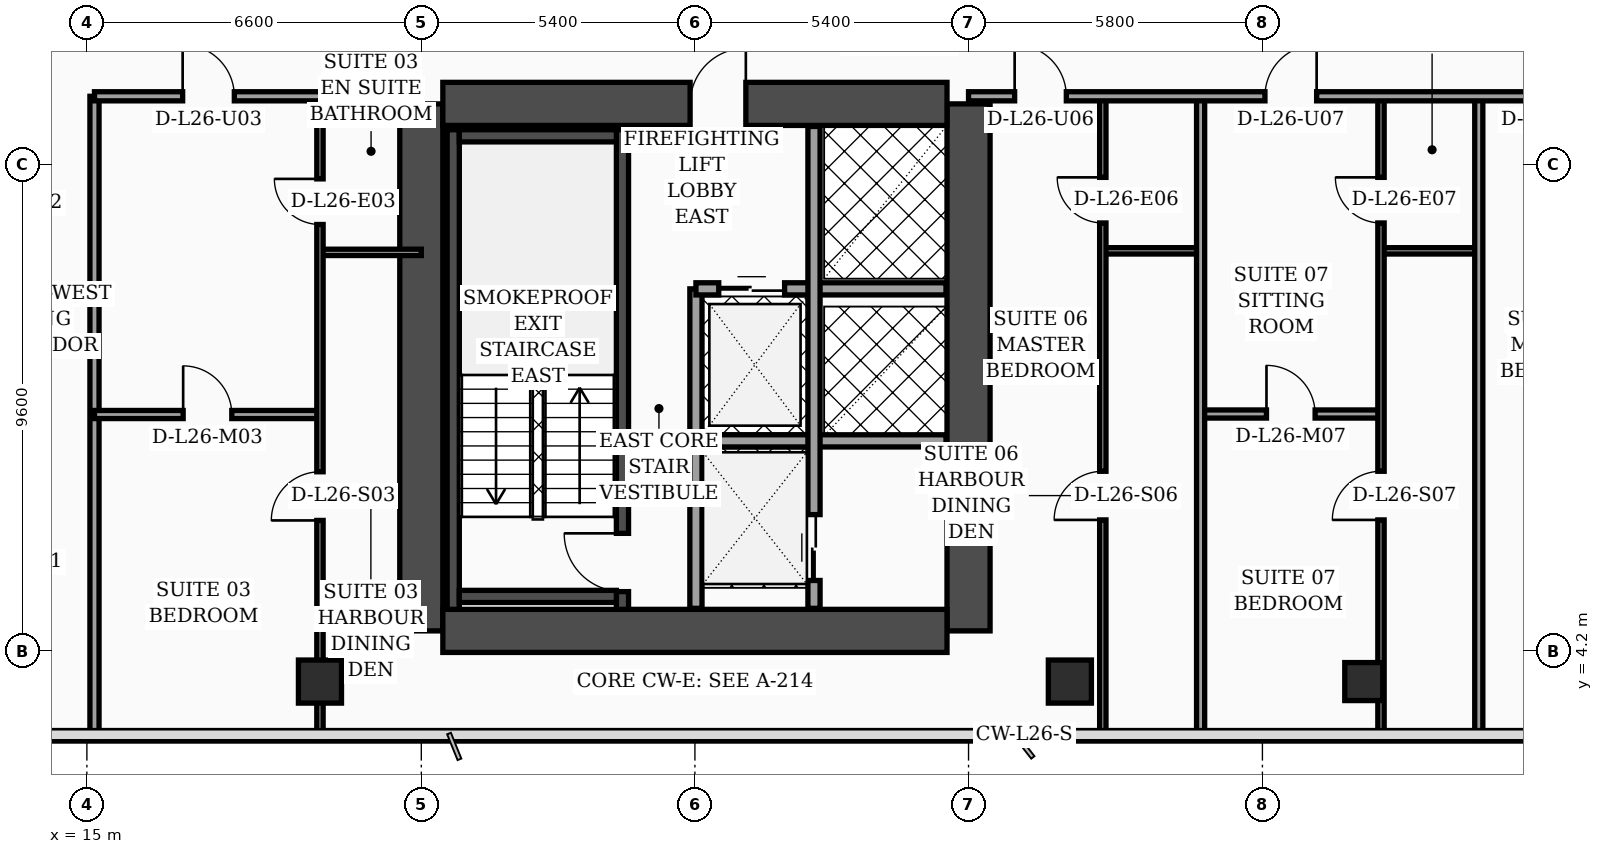
"""IFC4 building model, lengths in metres.
Left out: names, types, materials, properties, quantities, classifications, styles, units other than length and angle.
Written with IfcOpenShell. Run it as: python <this file> out.ifc"""

import sys

from ifc_helpers import new_model, si_unit, direction, frame, frame_2d, origin, origin_2d, place, context, subcontext, project, spatial, rectangle, hollow_rectangle, extrude, element, fill, save


model = new_model("IFC4")
c1 = context("Model", 3, precision=1e-05, world=origin(), true_north=direction((0.0, 1.0)))
c2 = subcontext(c1, "Body", "Model", "MODEL_VIEW")
j1 = project(units=[si_unit("LENGTHUNIT", "METRE"), si_unit("PLANEANGLEUNIT", "RADIAN")], contexts=[c1])
p1 = place(None, origin())
s1 = spatial("IfcSite", under=j1, at=p1, CompositionType="ELEMENT")
p2 = place(p1, origin())
s2 = spatial("IfcBuilding", under=s1, at=p2, CompositionType="ELEMENT")
p3 = place(p2, frame((0.0, 0.0, 108.8)))
s3 = spatial("IfcBuildingStorey", under=s2, at=p3, CompositionType="ELEMENT", Elevation=108.8)
for number, where, z_axis, x_axis in (
    (1, (21.6, 4.6, 0.0), (0.0, 0.0, 1.0), (0.0, 1.0, 0.0)),
    (2, (32.4, 4.6, 0.0), (0.0, 0.0, 1.0), (0.0, 1.0, 0.0)),
):
    element("IfcWall", number, at=place(p3, frame(where, z_axis=z_axis, x_axis=x_axis)), inside=s3, PredefinedType="SHEAR", context=c2, shape_type="SweptSolid", body=[
        extrude(rectangle(XDim=10.4, YDim=0.85, at=frame_2d((5.2, 0.0))), origin(), (0.0, 0.0, 1.0), 3.56),
    ])
p4 = place(p3, frame((22.025, 15.0, 0.0), z_axis=(0.0, 0.0, 1.0), x_axis=(1.0, 0.0, 0.0)))
e3 = element("IfcWall", 3, at=p4, inside=s3, PredefinedType="SHEAR", context=c2, shape_type="SweptSolid", body=[
    extrude(rectangle(XDim=9.95, YDim=0.85, at=frame_2d((4.975, 0.0))), origin(), (0.0, 0.0, 1.0), 3.56),
])
p5 = place(p4, frame((4.88, 0.0, 0.0)))
e4 = element("IfcOpeningElement", 4, at=p5, cuts=e3, PredefinedType="OPENING", context=c2, shape_type="SweptSolid", body=[
    extrude(rectangle(XDim=1.1, YDim=2.2, at=frame_2d((0.55, 1.1))), frame((0.0, 0.435, 0.0), z_axis=(0.0, -1.0, 0.0), x_axis=(1.0, 0.0, 0.0)), (0.0, 0.0, 1.0), 0.87),
])
p6 = place(p3, frame((22.025, 4.6, 0.0), z_axis=(0.0, 0.0, 1.0), x_axis=(1.0, 0.0, 0.0)))
e5 = element("IfcWall", 5, at=p6, inside=s3, PredefinedType="SHEAR", context=c2, shape_type="SweptSolid", body=[
    extrude(rectangle(XDim=9.95, YDim=0.85, at=frame_2d((4.975, 0.0))), origin(), (0.0, 0.0, 1.0), 3.56),
])
p7 = place(p3, frame((22.23, 5.025, 0.0), z_axis=(0.0, 0.0, 1.0), x_axis=(0.0, 1.0, 0.0)))
e6 = element("IfcWall", 6, at=p7, inside=s3, PredefinedType="SOLIDWALL", context=c2, shape_type="SweptSolid", body=[
    extrude(rectangle(XDim=9.465, YDim=0.24, at=frame_2d((4.732, 0.0))), origin(), (0.0, 0.0, 1.0), 3.56),
])
p8 = place(p3, frame((25.57, 5.025, 0.0), z_axis=(0.0, 0.0, 1.0), x_axis=(0.0, 1.0, 0.0)))
e7 = element("IfcWall", 7, at=p8, inside=s3, PredefinedType="SOLIDWALL", context=c2, shape_type="SweptSolid", body=[
    extrude(rectangle(XDim=9.465, YDim=0.24, at=frame_2d((4.732, 0.0))), origin(), (0.0, 0.0, 1.0), 3.56),
])
p9 = place(p8, frame((0.35, 0.0, 0.0)))
e8 = element("IfcOpeningElement", 8, at=p9, cuts=e7, PredefinedType="OPENING", context=c2, shape_type="SweptSolid", body=[
    extrude(rectangle(XDim=1.15, YDim=2.2, at=frame_2d((0.575, 1.1))), frame((0.0, 0.13, 0.0), z_axis=(0.0, -1.0, 0.0), x_axis=(1.0, 0.0, 0.0)), (0.0, 0.0, 1.0), 0.26),
])
for number, where, z_axis, x_axis in (
    (9, (22.35, 5.28, 0.0), (0.0, 0.0, 1.0), (1.0, 0.0, 0.0)),
    (10, (22.35, 14.37, 0.0), (0.0, 0.0, 1.0), (1.0, 0.0, 0.0)),
):
    element("IfcWall", number, at=place(p3, frame(where, z_axis=z_axis, x_axis=x_axis)), inside=s3, PredefinedType="SOLIDWALL", context=c2, shape_type="SweptSolid", body=[
        extrude(rectangle(XDim=3.1, YDim=0.24, at=frame_2d((1.55, 0.0))), origin(), (0.0, 0.0, 1.0), 3.56),
    ])
for number, where, z_axis, x_axis in (
    (11, (19.6, 3.6, 0.0), (0.0, 0.0, 1.0), (1.0, 0.0, 0.0)),
    (12, (34.4, 3.6, 0.0), (0.0, 0.0, 1.0), (1.0, 0.0, 0.0)),
):
    element("IfcColumn", number, at=place(p3, frame(where, z_axis=z_axis, x_axis=x_axis)), inside=s3, PredefinedType="COLUMN", context=c2, shape_type="SweptSolid", body=[
        extrude(hollow_rectangle(XDim=0.85, YDim=0.85, WallThickness=0.036, at=origin_2d()), origin(), (0.0, 0.0, 1.0), 3.56),
    ])
p10 = place(p3, frame((40.2, 3.6, 0.0), z_axis=(0.0, 0.0, 1.0), x_axis=(1.0, 0.0, 0.0)))
e13 = element("IfcColumn", 13, at=p10, inside=s3, PredefinedType="COLUMN", context=c2, shape_type="SweptSolid", body=[
    extrude(hollow_rectangle(XDim=0.75, YDim=0.75, WallThickness=0.032, at=origin_2d()), origin(), (0.0, 0.0, 1.0), 3.56),
])
p11 = place(p3, frame((27.02, 5.045, 0.0), z_axis=(0.0, 0.0, 1.0), x_axis=(0.0, 1.0, 0.0)))
e14 = element("IfcWall", 14, at=p11, inside=s3, PredefinedType="SOLIDWALL", context=c2, shape_type="SweptSolid", body=[
    extrude(rectangle(XDim=6.305, YDim=0.24, at=frame_2d((3.153, 0.0))), origin(), (0.0, 0.0, 1.0), 3.56),
])
p12 = place(p3, frame((27.02, 11.35, 0.0), z_axis=(0.0, 0.0, 1.0), x_axis=(1.0, 0.0, 0.0)))
e15 = element("IfcWall", 15, at=p12, inside=s3, PredefinedType="SOLIDWALL", context=c2, shape_type="SweptSolid", body=[
    extrude(rectangle(XDim=4.935, YDim=0.24, at=frame_2d((2.468, 0.0))), origin(), (0.0, 0.0, 1.0), 3.56),
])
p13 = place(p12, frame((0.45, 0.0, 0.0)))
e16 = element("IfcOpeningElement", 16, at=p13, cuts=e15, PredefinedType="OPENING", context=c2, shape_type="SweptSolid", body=[
    extrude(rectangle(XDim=1.3, YDim=2.35, at=frame_2d((0.65, 1.175))), frame((0.0, 0.13, 0.0), z_axis=(0.0, -1.0, 0.0), x_axis=(1.0, 0.0, 0.0)), (0.0, 0.0, 1.0), 0.26),
])
p14 = place(p3, frame((27.02, 8.35, 0.0), z_axis=(0.0, 0.0, 1.0), x_axis=(1.0, 0.0, 0.0)))
e17 = element("IfcWall", 17, at=p14, inside=s3, PredefinedType="SOLIDWALL", context=c2, shape_type="SweptSolid", body=[
    extrude(rectangle(XDim=4.935, YDim=0.24, at=frame_2d((2.468, 0.0))), origin(), (0.0, 0.0, 1.0), 3.56),
])
p15 = place(p3, frame((29.35, 5.045, 0.0), z_axis=(0.0, 0.0, 1.0), x_axis=(0.0, 1.0, 0.0)))
e18 = element("IfcWall", 18, at=p15, inside=s3, PredefinedType="SOLIDWALL", context=c2, shape_type="SweptSolid", body=[
    extrude(rectangle(XDim=9.51, YDim=0.24, at=frame_2d((4.755, 0.0))), origin(), (0.0, 0.0, 1.0), 3.56),
])
p16 = place(p15, frame((0.55, 0.0, 0.0)))
e19 = element("IfcOpeningElement", 19, at=p16, cuts=e18, PredefinedType="OPENING", context=c2, shape_type="SweptSolid", body=[
    extrude(rectangle(XDim=1.3, YDim=2.35, at=frame_2d((0.65, 1.175))), frame((0.0, 0.13, 0.0), z_axis=(0.0, -1.0, 0.0), x_axis=(1.0, 0.0, 0.0)), (0.0, 0.0, 1.0), 0.26),
])
p17 = place(p3, frame((15.15, 2.44, 0.0), z_axis=(0.0, 0.0, 1.0), x_axis=(0.0, 1.0, 0.0)))
e20 = element("IfcWall", 20, at=p17, inside=s3, PredefinedType="PARTITIONING", context=c2, shape_type="SweptSolid", body=[
    extrude(rectangle(XDim=12.71, YDim=0.18, at=frame_2d((6.355, 0.0))), origin(), (0.0, 0.0, 1.0), 3.04),
])
p18 = place(p3, frame((19.6, 12.07, 0.0), z_axis=(0.0, 0.0, 1.0), x_axis=(1.0, 0.0, 0.0)))
e21 = element("IfcWall", 21, at=p18, inside=s3, PredefinedType="PARTITIONING", context=c2, shape_type="SweptSolid", body=[
    extrude(rectangle(XDim=2.0, YDim=0.125, at=frame_2d((1.0, 0.0))), origin(), (0.0, 0.0, 1.0), 3.56),
])
p19 = place(p3, frame((15.15, 8.87, 0.0), z_axis=(0.0, 0.0, 1.0), x_axis=(1.0, 0.0, 0.0)))
e22 = element("IfcWall", 22, at=p19, inside=s3, PredefinedType="PARTITIONING", context=c2, shape_type="SweptSolid", body=[
    extrude(rectangle(XDim=4.45, YDim=0.16, at=frame_2d((2.225, 0.0))), origin(), (0.0, 0.0, 1.0), 3.56),
])
p20 = place(p19, frame((1.75, 0.0, 0.0)))
e23 = element("IfcOpeningElement", 23, at=p20, cuts=e22, PredefinedType="OPENING", context=c2, shape_type="SweptSolid", body=[
    extrude(rectangle(XDim=0.96, YDim=2.2, at=frame_2d((0.48, 1.1))), frame((0.0, 0.09, 0.0), z_axis=(0.0, -1.0, 0.0), x_axis=(1.0, 0.0, 0.0)), (0.0, 0.0, 1.0), 0.18),
])
p21 = place(p3, frame((19.6, 2.44, 0.0), z_axis=(0.0, 0.0, 1.0), x_axis=(0.0, 1.0, 0.0)))
e24 = element("IfcWall", 24, at=p21, inside=s3, PredefinedType="PARTITIONING", context=c2, shape_type="SweptSolid", body=[
    extrude(rectangle(XDim=12.71, YDim=0.125, at=frame_2d((6.355, 0.0))), origin(), (0.0, 0.0, 1.0), 2.49),
])
p22 = place(p21, frame((4.34, 0.0, 0.0)))
e25 = element("IfcOpeningElement", 25, at=p22, cuts=e24, PredefinedType="OPENING", context=c2, shape_type="SweptSolid", body=[
    extrude(rectangle(XDim=0.96, YDim=2.2, at=frame_2d((0.48, 1.1))), frame((0.0, 0.073, 0.0), z_axis=(0.0, -1.0, 0.0), x_axis=(1.0, 0.0, 0.0)), (0.0, 0.0, 1.0), 0.145),
])
p23 = place(p21, frame((10.18, 0.0, 0.0)))
e26 = element("IfcOpeningElement", 26, at=p23, cuts=e24, PredefinedType="OPENING", context=c2, shape_type="SweptSolid", body=[
    extrude(rectangle(XDim=0.9, YDim=2.15, at=frame_2d((0.45, 1.075))), frame((0.0, 0.073, 0.0), z_axis=(0.0, -1.0, 0.0), x_axis=(1.0, 0.0, 0.0)), (0.0, 0.0, 1.0), 0.145),
])
p24 = place(p3, frame((15.15, 15.15, 0.0), z_axis=(0.0, 0.0, 1.0), x_axis=(1.0, 0.0, 0.0)))
e27 = element("IfcWall", 27, at=p24, inside=s3, PredefinedType="PARTITIONING", context=c2, shape_type="SweptSolid", body=[
    extrude(rectangle(XDim=6.45, YDim=0.18, at=frame_2d((3.225, 0.0))), origin(), (0.0, 0.0, 1.0), 2.49),
])
p25 = place(p24, frame((1.74, 0.0, 0.0)))
e28 = element("IfcOpeningElement", 28, at=p25, cuts=e27, PredefinedType="OPENING", context=c2, shape_type="SweptSolid", body=[
    extrude(rectangle(XDim=1.02, YDim=2.2, at=frame_2d((0.51, 1.1))), frame((0.0, 0.1, 0.0), z_axis=(0.0, -1.0, 0.0), x_axis=(1.0, 0.0, 0.0)), (0.0, 0.0, 1.0), 0.2),
])
p26 = place(p3, frame((35.05, 12.1, 0.0), z_axis=(0.0, 0.0, 1.0), x_axis=(1.0, 0.0, 0.0)))
e29 = element("IfcWall", 29, at=p26, inside=s3, PredefinedType="PARTITIONING", context=c2, shape_type="SweptSolid", body=[
    extrude(rectangle(XDim=1.93, YDim=0.125, at=frame_2d((0.965, 0.0))), origin(), (0.0, 0.0, 1.0), 2.84),
])
p27 = place(p3, frame((35.05, 2.44, 0.0), z_axis=(0.0, 0.0, 1.0), x_axis=(0.0, 1.0, 0.0)))
e30 = element("IfcWall", 30, at=p27, inside=s3, PredefinedType="PARTITIONING", context=c2, shape_type="SweptSolid", body=[
    extrude(rectangle(XDim=12.71, YDim=0.125, at=frame_2d((6.355, 0.0))), origin(), (0.0, 0.0, 1.0), 2.84),
])
p28 = place(p27, frame((4.35, 0.0, 0.0)))
e31 = element("IfcOpeningElement", 31, at=p28, cuts=e30, PredefinedType="OPENING", context=c2, shape_type="SweptSolid", body=[
    extrude(rectangle(XDim=0.96, YDim=2.2, at=frame_2d((0.48, 1.1))), frame((0.0, 0.073, 0.0), z_axis=(0.0, -1.0, 0.0), x_axis=(1.0, 0.0, 0.0)), (0.0, 0.0, 1.0), 0.145),
])
p29 = place(p27, frame((10.21, 0.0, 0.0)))
e32 = element("IfcOpeningElement", 32, at=p29, cuts=e30, PredefinedType="OPENING", context=c2, shape_type="SweptSolid", body=[
    extrude(rectangle(XDim=0.9, YDim=2.15, at=frame_2d((0.45, 1.075))), frame((0.0, 0.073, 0.0), z_axis=(0.0, -1.0, 0.0), x_axis=(1.0, 0.0, 0.0)), (0.0, 0.0, 1.0), 0.145),
])
p30 = place(p3, frame((40.54, 12.1, 0.0), z_axis=(0.0, 0.0, 1.0), x_axis=(1.0, 0.0, 0.0)))
e33 = element("IfcWall", 33, at=p30, inside=s3, PredefinedType="PARTITIONING", context=c2, shape_type="SweptSolid", body=[
    extrude(rectangle(XDim=1.93, YDim=0.125, at=frame_2d((0.965, 0.0))), origin(), (0.0, 0.0, 1.0), 3.56),
])
p31 = place(p3, frame((36.98, 8.88, 0.0), z_axis=(0.0, 0.0, 1.0), x_axis=(1.0, 0.0, 0.0)))
e34 = element("IfcWall", 34, at=p31, inside=s3, PredefinedType="PARTITIONING", context=c2, shape_type="SweptSolid", body=[
    extrude(rectangle(XDim=3.56, YDim=0.16, at=frame_2d((1.78, 0.0))), origin(), (0.0, 0.0, 1.0), 2.84),
])
p32 = place(p31, frame((1.3, 0.0, 0.0)))
e35 = element("IfcOpeningElement", 35, at=p32, cuts=e34, PredefinedType="OPENING", context=c2, shape_type="SweptSolid", body=[
    extrude(rectangle(XDim=0.96, YDim=2.2, at=frame_2d((0.48, 1.1))), frame((0.0, 0.09, 0.0), z_axis=(0.0, -1.0, 0.0), x_axis=(1.0, 0.0, 0.0)), (0.0, 0.0, 1.0), 0.18),
])
p33 = place(p3, frame((40.54, 2.44, 0.0), z_axis=(0.0, 0.0, 1.0), x_axis=(0.0, 1.0, 0.0)))
e36 = element("IfcWall", 36, at=p33, inside=s3, PredefinedType="PARTITIONING", context=c2, shape_type="SweptSolid", body=[
    extrude(rectangle(XDim=12.71, YDim=0.125, at=frame_2d((6.355, 0.0))), origin(), (0.0, 0.0, 1.0), 2.84),
])
p34 = place(p33, frame((4.35, 0.0, 0.0)))
e37 = element("IfcOpeningElement", 37, at=p34, cuts=e36, PredefinedType="OPENING", context=c2, shape_type="SweptSolid", body=[
    extrude(rectangle(XDim=0.96, YDim=2.2, at=frame_2d((0.48, 1.1))), frame((0.0, 0.073, 0.0), z_axis=(0.0, -1.0, 0.0), x_axis=(1.0, 0.0, 0.0)), (0.0, 0.0, 1.0), 0.145),
])
p35 = place(p33, frame((10.21, 0.0, 0.0)))
e38 = element("IfcOpeningElement", 38, at=p35, cuts=e36, PredefinedType="OPENING", context=c2, shape_type="SweptSolid", body=[
    extrude(rectangle(XDim=0.9, YDim=2.15, at=frame_2d((0.45, 1.075))), frame((0.0, 0.073, 0.0), z_axis=(0.0, -1.0, 0.0), x_axis=(1.0, 0.0, 0.0)), (0.0, 0.0, 1.0), 0.145),
])
p36 = place(p3, frame((36.98, 2.44, 0.0), z_axis=(0.0, 0.0, 1.0), x_axis=(0.0, 1.0, 0.0)))
e39 = element("IfcWall", 39, at=p36, inside=s3, PredefinedType="PARTITIONING", context=c2, shape_type="SweptSolid", body=[
    extrude(rectangle(XDim=12.71, YDim=0.16, at=frame_2d((6.355, 0.0))), origin(), (0.0, 0.0, 1.0), 2.84),
])
p37 = place(p3, frame((42.47, 2.44, 0.0), z_axis=(0.0, 0.0, 1.0), x_axis=(0.0, 1.0, 0.0)))
e40 = element("IfcWall", 40, at=p37, inside=s3, PredefinedType="PARTITIONING", context=c2, shape_type="SweptSolid", body=[
    extrude(rectangle(XDim=12.71, YDim=0.16, at=frame_2d((6.355, 0.0))), origin(), (0.0, 0.0, 1.0), 3.04),
])
p38 = place(p3, frame((32.4, 15.15, 0.0), z_axis=(0.0, 0.0, 1.0), x_axis=(1.0, 0.0, 0.0)))
e41 = element("IfcWall", 41, at=p38, inside=s3, PredefinedType="PARTITIONING", context=c2, shape_type="SweptSolid", body=[
    extrude(rectangle(XDim=15.0, YDim=0.18, at=frame_2d((7.5, 0.0))), origin(), (0.0, 0.0, 1.0), 2.84),
])
p39 = place(p38, frame((0.91, 0.0, 0.0)))
e42 = element("IfcOpeningElement", 42, at=p39, cuts=e41, PredefinedType="OPENING", context=c2, shape_type="SweptSolid", body=[
    extrude(rectangle(XDim=1.02, YDim=2.2, at=frame_2d((0.51, 1.1))), frame((0.0, 0.1, 0.0), z_axis=(0.0, -1.0, 0.0), x_axis=(1.0, 0.0, 0.0)), (0.0, 0.0, 1.0), 0.2),
])
p40 = place(p38, frame((5.85, 0.0, 0.0)))
e43 = element("IfcOpeningElement", 43, at=p40, cuts=e41, PredefinedType="OPENING", context=c2, shape_type="SweptSolid", body=[
    extrude(rectangle(XDim=1.02, YDim=2.2, at=frame_2d((0.51, 1.1))), frame((0.0, 0.1, 0.0), z_axis=(0.0, -1.0, 0.0), x_axis=(1.0, 0.0, 0.0)), (0.0, 0.0, 1.0), 0.2),
])
p41 = place(p38, frame((11.06, 0.0, 0.0)))
e44 = element("IfcOpeningElement", 44, at=p41, cuts=e41, PredefinedType="OPENING", context=c2, shape_type="SweptSolid", body=[
    extrude(rectangle(XDim=1.02, YDim=2.2, at=frame_2d((0.51, 1.1))), frame((0.0, 0.1, 0.0), z_axis=(0.0, -1.0, 0.0), x_axis=(1.0, 0.0, 0.0)), (0.0, 0.0, 1.0), 0.2),
])
p42 = place(p13, origin())
e45 = element("IfcDoor", 45, at=p42, inside=s3, OperationType="DOUBLE_DOOR_SLIDING", PredefinedType="DOOR", context=c2, shape_type="SweptSolid", body=[
    extrude(rectangle(XDim=1.3, YDim=2.35, at=frame_2d((0.65, 1.175))), frame((0.0, 0.025, 0.0), z_axis=(0.0, -1.0, 0.0), x_axis=(1.0, 0.0, 0.0)), (0.0, 0.0, 1.0), 0.05),
])
fill(e16, e45)
p43 = place(p16, origin())
e46 = element("IfcDoor", 46, at=p43, inside=s3, OperationType="DOUBLE_DOOR_SLIDING", PredefinedType="DOOR", context=c2, shape_type="SweptSolid", body=[
    extrude(rectangle(XDim=1.3, YDim=2.35, at=frame_2d((0.65, 1.175))), frame((0.0, 0.025, 0.0), z_axis=(0.0, -1.0, 0.0), x_axis=(1.0, 0.0, 0.0)), (0.0, 0.0, 1.0), 0.05),
])
fill(e19, e46)
p44 = place(p20, origin())
e47 = element("IfcDoor", 47, at=p44, inside=s3, OperationType="SINGLE_SWING_LEFT", PredefinedType="DOOR", context=c2, shape_type="SweptSolid", body=[
    extrude(rectangle(XDim=0.96, YDim=2.2, at=frame_2d((0.48, 1.1))), frame((0.0, 0.025, 0.0), z_axis=(0.0, -1.0, 0.0), x_axis=(1.0, 0.0, 0.0)), (0.0, 0.0, 1.0), 0.05),
])
fill(e23, e47)
p45 = place(p22, origin())
e48 = element("IfcDoor", 48, at=p45, inside=s3, OperationType="SINGLE_SWING_LEFT", PredefinedType="DOOR", context=c2, shape_type="SweptSolid", body=[
    extrude(rectangle(XDim=0.96, YDim=2.2, at=frame_2d((0.48, 1.1))), frame((0.0, 0.025, 0.0), z_axis=(0.0, -1.0, 0.0), x_axis=(1.0, 0.0, 0.0)), (0.0, 0.0, 1.0), 0.05),
])
fill(e25, e48)
p46 = place(p23, origin())
e49 = element("IfcDoor", 49, at=p46, inside=s3, OperationType="SINGLE_SWING_RIGHT", PredefinedType="DOOR", context=c2, shape_type="SweptSolid", body=[
    extrude(rectangle(XDim=0.9, YDim=2.15, at=frame_2d((0.45, 1.075))), frame((0.0, 0.025, 0.0), z_axis=(0.0, -1.0, 0.0), x_axis=(1.0, 0.0, 0.0)), (0.0, 0.0, 1.0), 0.05),
])
fill(e26, e49)
p47 = place(p25, origin())
e50 = element("IfcDoor", 50, at=p47, inside=s3, OperationType="SINGLE_SWING_LEFT", PredefinedType="DOOR", context=c2, shape_type="SweptSolid", body=[
    extrude(rectangle(XDim=1.02, YDim=2.2, at=frame_2d((0.51, 1.1))), frame((0.0, 0.025, 0.0), z_axis=(0.0, -1.0, 0.0), x_axis=(1.0, 0.0, 0.0)), (0.0, 0.0, 1.0), 0.05),
])
fill(e28, e50)
p48 = place(p28, origin())
e51 = element("IfcDoor", 51, at=p48, inside=s3, OperationType="SINGLE_SWING_LEFT", PredefinedType="DOOR", context=c2, shape_type="SweptSolid", body=[
    extrude(rectangle(XDim=0.96, YDim=2.2, at=frame_2d((0.48, 1.1))), frame((0.0, 0.025, 0.0), z_axis=(0.0, -1.0, 0.0), x_axis=(1.0, 0.0, 0.0)), (0.0, 0.0, 1.0), 0.05),
])
fill(e31, e51)
p49 = place(p29, origin())
e52 = element("IfcDoor", 52, at=p49, inside=s3, OperationType="SINGLE_SWING_RIGHT", PredefinedType="DOOR", context=c2, shape_type="SweptSolid", body=[
    extrude(rectangle(XDim=0.9, YDim=2.15, at=frame_2d((0.45, 1.075))), frame((0.0, 0.025, 0.0), z_axis=(0.0, -1.0, 0.0), x_axis=(1.0, 0.0, 0.0)), (0.0, 0.0, 1.0), 0.05),
])
fill(e32, e52)
p50 = place(p32, origin())
e53 = element("IfcDoor", 53, at=p50, inside=s3, OperationType="SINGLE_SWING_LEFT", PredefinedType="DOOR", context=c2, shape_type="SweptSolid", body=[
    extrude(rectangle(XDim=0.96, YDim=2.2, at=frame_2d((0.48, 1.1))), frame((0.0, 0.025, 0.0), z_axis=(0.0, -1.0, 0.0), x_axis=(1.0, 0.0, 0.0)), (0.0, 0.0, 1.0), 0.05),
])
fill(e35, e53)
p51 = place(p34, origin())
e54 = element("IfcDoor", 54, at=p51, inside=s3, OperationType="SINGLE_SWING_LEFT", PredefinedType="DOOR", context=c2, shape_type="SweptSolid", body=[
    extrude(rectangle(XDim=0.96, YDim=2.2, at=frame_2d((0.48, 1.1))), frame((0.0, 0.025, 0.0), z_axis=(0.0, -1.0, 0.0), x_axis=(1.0, 0.0, 0.0)), (0.0, 0.0, 1.0), 0.05),
])
fill(e37, e54)
p52 = place(p35, origin())
e55 = element("IfcDoor", 55, at=p52, inside=s3, OperationType="SINGLE_SWING_RIGHT", PredefinedType="DOOR", context=c2, shape_type="SweptSolid", body=[
    extrude(rectangle(XDim=0.9, YDim=2.15, at=frame_2d((0.45, 1.075))), frame((0.0, 0.025, 0.0), z_axis=(0.0, -1.0, 0.0), x_axis=(1.0, 0.0, 0.0)), (0.0, 0.0, 1.0), 0.05),
])
fill(e38, e55)
p53 = place(p39, origin())
e56 = element("IfcDoor", 56, at=p53, inside=s3, OperationType="SINGLE_SWING_LEFT", PredefinedType="DOOR", context=c2, shape_type="SweptSolid", body=[
    extrude(rectangle(XDim=1.02, YDim=2.2, at=frame_2d((0.51, 1.1))), frame((0.0, 0.025, 0.0), z_axis=(0.0, -1.0, 0.0), x_axis=(1.0, 0.0, 0.0)), (0.0, 0.0, 1.0), 0.05),
])
fill(e42, e56)
p54 = place(p40, origin())
e57 = element("IfcDoor", 57, at=p54, inside=s3, OperationType="SINGLE_SWING_RIGHT", PredefinedType="DOOR", context=c2, shape_type="SweptSolid", body=[
    extrude(rectangle(XDim=1.02, YDim=2.2, at=frame_2d((0.51, 1.1))), frame((0.0, 0.025, 0.0), z_axis=(0.0, -1.0, 0.0), x_axis=(1.0, 0.0, 0.0)), (0.0, 0.0, 1.0), 0.05),
])
fill(e43, e57)
p55 = place(p9, origin())
e58 = element("IfcDoor", 58, at=p55, inside=s3, OperationType="SINGLE_SWING_RIGHT", PredefinedType="DOOR", context=c2, shape_type="SweptSolid", body=[
    extrude(rectangle(XDim=1.15, YDim=2.2, at=frame_2d((0.575, 1.1))), frame((0.0, 0.025, 0.0), z_axis=(0.0, -1.0, 0.0), x_axis=(1.0, 0.0, 0.0)), (0.0, 0.0, 1.0), 0.05),
])
fill(e8, e58)
p56 = place(p5, origin())
e59 = element("IfcDoor", 59, at=p56, inside=s3, OperationType="SINGLE_SWING_RIGHT", PredefinedType="DOOR", context=c2, shape_type="SweptSolid", body=[
    extrude(rectangle(XDim=1.1, YDim=2.2, at=frame_2d((0.55, 1.1))), frame((0.0, 0.025, 0.0), z_axis=(0.0, -1.0, 0.0), x_axis=(1.0, 0.0, 0.0)), (0.0, 0.0, 1.0), 0.05),
])
fill(e4, e59)
save(model, sys.argv[1])
